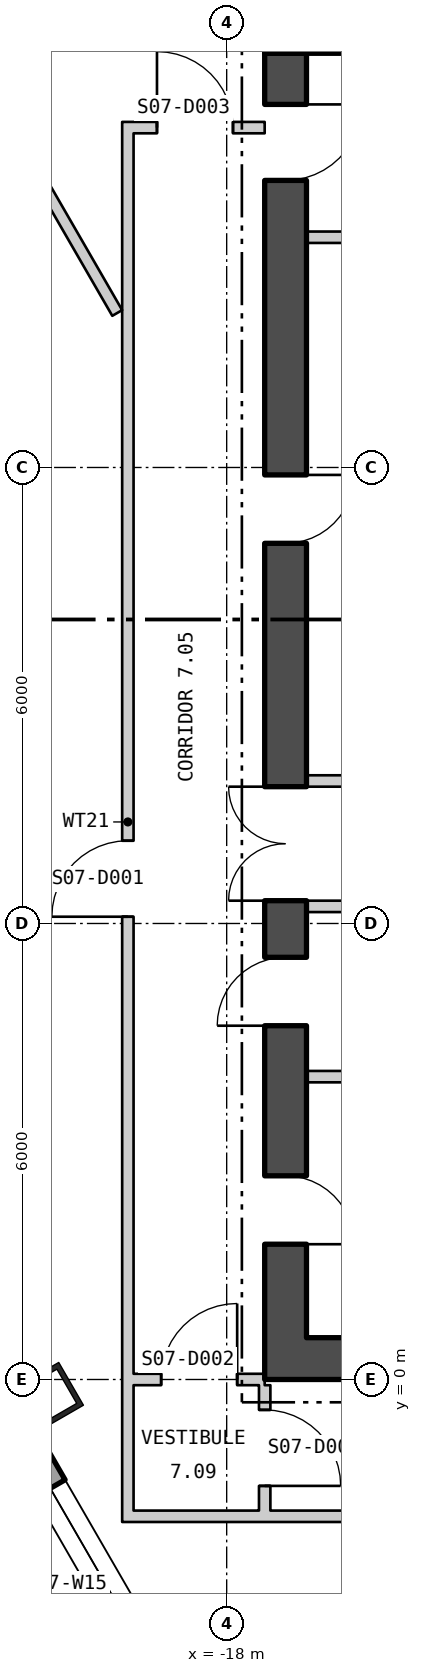
"""IFC4 building model, lengths in metres.
Left out: names, types, materials, properties, quantities, classifications, styles, units other than length and angle.
Written with IfcOpenShell. Run it as: python <this file> out.ifc"""

import sys

from ifc_helpers import new_model, si_unit, direction, frame, frame_2d, origin, origin_2d, place, context, subcontext, project, spatial, polyline, rectangle, hollow_rectangle, outline, extrude, element, fill, save


model = new_model("IFC4")
c1 = context("Model", 3, precision=1e-05, world=origin(), true_north=direction((0.0, 1.0)))
c2 = subcontext(c1, "Body", "Model", "MODEL_VIEW")
j1 = project(units=[si_unit("LENGTHUNIT", "METRE"), si_unit("PLANEANGLEUNIT", "RADIAN")], contexts=[c1])
p1 = place(None, origin())
s1 = spatial("IfcSite", under=j1, at=p1, CompositionType="ELEMENT")
p2 = place(p1, origin())
s2 = spatial("IfcBuilding", under=s1, at=p2, CompositionType="ELEMENT")
p3 = place(p2, frame((0.0, 0.0, 97.8)))
s3 = spatial("IfcBuildingStorey", under=s2, at=p3, CompositionType="ELEMENT", Elevation=97.8)
p4 = place(p3, frame((-20.35, -0.232, 0.0), z_axis=(0.0, 0.0, 1.0), x_axis=(0.5, -0.866025403784, 0.0)))
e1 = element("IfcColumn", 1, at=p4, inside=s3, PredefinedType="COLUMN", context=c2, shape_type="SweptSolid", body=[
    extrude(hollow_rectangle(XDim=0.65, YDim=0.7, WallThickness=0.065, at=origin_2d()), origin(), (0.0, 0.0, 1.0), 4.5),
])
p5 = place(p3, frame((-27.775, 11.479, -0.18), z_axis=(0.0, 0.0, 1.0), x_axis=(0.500000711659, -0.866024992908, 0.0)))
e2 = element("IfcWall", 2, at=p5, inside=s3, PredefinedType="SOLIDWALL", context=c2, shape_type="SweptSolid", body=[
    extrude(outline(polyline([(-0.13, -0.225), (45.87, -0.225), (45.61, 0.225), (0.13, 0.225), (-0.13, -0.225)])), origin(), (0.0, 0.0, 1.0), 4.28),
])
p6 = place(p5, frame((1.424, 0.0, 1.08)))
e3 = element("IfcOpeningElement", 3, at=p6, cuts=e2, PredefinedType="OPENING", context=c2, shape_type="SweptSolid", body=[
    extrude(rectangle(XDim=2.4, YDim=2.6, at=frame_2d((1.2, 1.3))), frame((0.0, 0.235, 0.0), z_axis=(0.0, -1.0, 0.0), x_axis=(1.0, 0.0, 0.0)), (0.0, 0.0, 1.0), 0.47),
])
p7 = place(p5, frame((5.893, 0.0, 1.08)))
e4 = element("IfcOpeningElement", 4, at=p7, cuts=e2, PredefinedType="OPENING", context=c2, shape_type="SweptSolid", body=[
    extrude(rectangle(XDim=2.4, YDim=2.6, at=frame_2d((1.2, 1.3))), frame((0.0, 0.235, 0.0), z_axis=(0.0, -1.0, 0.0), x_axis=(1.0, 0.0, 0.0)), (0.0, 0.0, 1.0), 0.47),
])
p8 = place(p5, frame((10.401, 0.0, 1.08)))
e5 = element("IfcOpeningElement", 5, at=p8, cuts=e2, PredefinedType="OPENING", context=c2, shape_type="SweptSolid", body=[
    extrude(rectangle(XDim=2.4, YDim=2.6, at=frame_2d((1.2, 1.3))), frame((0.0, 0.235, 0.0), z_axis=(0.0, -1.0, 0.0), x_axis=(1.0, 0.0, 0.0)), (0.0, 0.0, 1.0), 0.47),
])
p9 = place(p5, frame((14.909, 0.0, 1.08)))
e6 = element("IfcOpeningElement", 6, at=p9, cuts=e2, PredefinedType="OPENING", context=c2, shape_type="SweptSolid", body=[
    extrude(rectangle(XDim=2.4, YDim=2.6, at=frame_2d((1.2, 1.3))), frame((0.0, 0.235, 0.0), z_axis=(0.0, -1.0, 0.0), x_axis=(1.0, 0.0, 0.0)), (0.0, 0.0, 1.0), 0.47),
])
p10 = place(p5, frame((19.416, 0.0, 1.08)))
e7 = element("IfcOpeningElement", 7, at=p10, cuts=e2, PredefinedType="OPENING", context=c2, shape_type="SweptSolid", body=[
    extrude(rectangle(XDim=2.4, YDim=2.6, at=frame_2d((1.2, 1.3))), frame((0.0, 0.235, 0.0), z_axis=(0.0, -1.0, 0.0), x_axis=(1.0, 0.0, 0.0)), (0.0, 0.0, 1.0), 0.47),
])
p11 = place(p5, frame((23.924, 0.0, 1.08)))
e8 = element("IfcOpeningElement", 8, at=p11, cuts=e2, PredefinedType="OPENING", context=c2, shape_type="SweptSolid", body=[
    extrude(rectangle(XDim=2.4, YDim=2.6, at=frame_2d((1.2, 1.3))), frame((0.0, 0.235, 0.0), z_axis=(0.0, -1.0, 0.0), x_axis=(1.0, 0.0, 0.0)), (0.0, 0.0, 1.0), 0.47),
])
p12 = place(p5, frame((28.431, 0.0, 1.08)))
e9 = element("IfcOpeningElement", 9, at=p12, cuts=e2, PredefinedType="OPENING", context=c2, shape_type="SweptSolid", body=[
    extrude(rectangle(XDim=2.4, YDim=2.6, at=frame_2d((1.2, 1.3))), frame((0.0, 0.235, 0.0), z_axis=(0.0, -1.0, 0.0), x_axis=(1.0, 0.0, 0.0)), (0.0, 0.0, 1.0), 0.47),
])
p13 = place(p5, frame((32.939, 0.0, 1.08)))
e10 = element("IfcOpeningElement", 10, at=p13, cuts=e2, PredefinedType="OPENING", context=c2, shape_type="SweptSolid", body=[
    extrude(rectangle(XDim=2.4, YDim=2.6, at=frame_2d((1.2, 1.3))), frame((0.0, 0.235, 0.0), z_axis=(0.0, -1.0, 0.0), x_axis=(1.0, 0.0, 0.0)), (0.0, 0.0, 1.0), 0.47),
])
p14 = place(p5, frame((37.447, 0.0, 1.08)))
e11 = element("IfcOpeningElement", 11, at=p14, cuts=e2, PredefinedType="OPENING", context=c2, shape_type="SweptSolid", body=[
    extrude(rectangle(XDim=2.4, YDim=2.6, at=frame_2d((1.2, 1.3))), frame((0.0, 0.235, 0.0), z_axis=(0.0, -1.0, 0.0), x_axis=(1.0, 0.0, 0.0)), (0.0, 0.0, 1.0), 0.47),
])
p15 = place(p5, frame((41.916, 0.0, 1.08)))
e12 = element("IfcOpeningElement", 12, at=p15, cuts=e2, PredefinedType="OPENING", context=c2, shape_type="SweptSolid", body=[
    extrude(rectangle(XDim=2.4, YDim=2.6, at=frame_2d((1.2, 1.3))), frame((0.0, 0.235, 0.0), z_axis=(0.0, -1.0, 0.0), x_axis=(1.0, 0.0, 0.0)), (0.0, 0.0, 1.0), 0.47),
])
p16 = place(p3, frame((-17.5, 0.275, 0.0), z_axis=(0.0, 0.0, 1.0), x_axis=(1.0, 0.0, 0.0)))
e13 = element("IfcWall", 13, at=p16, inside=s3, PredefinedType="SHEAR", context=c2, shape_type="SweptSolid", body=[
    extrude(rectangle(XDim=35.0, YDim=0.55, at=frame_2d((17.5, 0.0))), origin(), (0.0, 0.0, 1.0), 4.3),
])
p17 = place(p16, frame((12.0, 0.0, 0.0)))
e14 = element("IfcOpeningElement", 14, at=p17, cuts=e13, PredefinedType="OPENING", context=c2, shape_type="SweptSolid", body=[
    extrude(rectangle(XDim=1.8, YDim=2.4, at=frame_2d((0.9, 1.2))), frame((0.0, 0.285, 0.0), z_axis=(0.0, -1.0, 0.0), x_axis=(1.0, 0.0, 0.0)), (0.0, 0.0, 1.0), 0.57),
])
p18 = place(p16, frame((22.0, 0.0, 0.0)))
e15 = element("IfcOpeningElement", 15, at=p18, cuts=e13, PredefinedType="OPENING", context=c2, shape_type="SweptSolid", body=[
    extrude(rectangle(XDim=1.8, YDim=2.4, at=frame_2d((0.9, 1.2))), frame((0.0, 0.285, 0.0), z_axis=(0.0, -1.0, 0.0), x_axis=(1.0, 0.0, 0.0)), (0.0, 0.0, 1.0), 0.57),
])
p19 = place(p3, frame((-17.5, 17.725, 0.0), z_axis=(0.0, 0.0, 1.0), x_axis=(1.0, 0.0, 0.0)))
e16 = element("IfcWall", 16, at=p19, inside=s3, PredefinedType="SHEAR", context=c2, shape_type="SweptSolid", body=[
    extrude(rectangle(XDim=35.0, YDim=0.55, at=frame_2d((17.5, 0.0))), origin(), (0.0, 0.0, 1.0), 4.3),
])
p20 = place(p3, frame((-17.225, 0.55, 0.0), z_axis=(0.0, 0.0, 1.0), x_axis=(0.0, 1.0, 0.0)))
e17 = element("IfcWall", 17, at=p20, inside=s3, PredefinedType="SHEAR", context=c2, shape_type="SweptSolid", body=[
    extrude(rectangle(XDim=16.9, YDim=0.55, at=frame_2d((8.45, 0.0))), origin(), (0.0, 0.0, 1.0), 4.3),
])
p21 = place(p20, frame((5.75, 0.0, 0.0)))
e18 = element("IfcOpeningElement", 18, at=p21, cuts=e17, PredefinedType="OPENING", context=c2, shape_type="SweptSolid", body=[
    extrude(rectangle(XDim=1.5, YDim=2.1, at=frame_2d((0.75, 1.05))), frame((0.0, 0.285, 0.0), z_axis=(0.0, -1.0, 0.0), x_axis=(1.0, 0.0, 0.0)), (0.0, 0.0, 1.0), 0.57),
])
p22 = place(p20, frame((1.23, 0.0, 0.0)))
e19 = element("IfcOpeningElement", 19, at=p22, cuts=e17, PredefinedType="OPENING", context=c2, shape_type="SweptSolid", body=[
    extrude(rectangle(XDim=0.9, YDim=2.1, at=frame_2d((0.45, 1.05))), frame((0.0, 0.285, 0.0), z_axis=(0.0, -1.0, 0.0), x_axis=(1.0, 0.0, 0.0)), (0.0, 0.0, 1.0), 0.57),
])
p23 = place(p20, frame((4.105, 0.0, 0.0)))
e20 = element("IfcOpeningElement", 20, at=p23, cuts=e17, PredefinedType="OPENING", context=c2, shape_type="SweptSolid", body=[
    extrude(rectangle(XDim=0.9, YDim=2.1, at=frame_2d((0.45, 1.05))), frame((0.0, 0.285, 0.0), z_axis=(0.0, -1.0, 0.0), x_axis=(1.0, 0.0, 0.0)), (0.0, 0.0, 1.0), 0.57),
])
p24 = place(p20, frame((10.452, 0.0, 0.0)))
e21 = element("IfcOpeningElement", 21, at=p24, cuts=e17, PredefinedType="OPENING", context=c2, shape_type="SweptSolid", body=[
    extrude(rectangle(XDim=0.9, YDim=2.1, at=frame_2d((0.45, 1.05))), frame((0.0, 0.285, 0.0), z_axis=(0.0, -1.0, 0.0), x_axis=(1.0, 0.0, 0.0)), (0.0, 0.0, 1.0), 0.57),
])
p25 = place(p20, frame((15.227, 0.0, 0.0)))
e22 = element("IfcOpeningElement", 22, at=p25, cuts=e17, PredefinedType="OPENING", context=c2, shape_type="SweptSolid", body=[
    extrude(rectangle(XDim=1.0, YDim=2.1, at=frame_2d((0.5, 1.05))), frame((0.0, 0.285, 0.0), z_axis=(0.0, -1.0, 0.0), x_axis=(1.0, 0.0, 0.0)), (0.0, 0.0, 1.0), 0.57),
])
for number, where, z_axis, x_axis in (
    (23, (-16.95, 6.225, 0.0), (0.0, 0.0, 1.0), (1.0, 0.0, 0.0)),
    (24, (-16.95, 7.875, 0.0), (0.0, 0.0, 1.0), (1.0, 0.0, 0.0)),
    (25, (-16.95, 3.985, 0.0), (0.0, 0.0, 1.0), (1.0, 0.0, 0.0)),
    (26, (-16.95, 15.029, 0.0), (0.0, 0.0, 1.0), (1.0, 0.0, 0.0)),
):
    element("IfcWall", number, at=place(p3, frame(where, z_axis=z_axis, x_axis=x_axis)), inside=s3, PredefinedType="PARTITIONING", context=c2, shape_type="SweptSolid", body=[
        extrude(rectangle(XDim=2.45, YDim=0.15, at=frame_2d((1.225, 0.0))), origin(), (0.0, 0.0, 1.0), 4.3),
    ])
p26 = place(p3, frame((-22.411, 19.18, 0.0), z_axis=(0.0, 0.0, 1.0), x_axis=(0.499921522108, -0.866070708276, 0.0)))
e27 = element("IfcWall", 27, at=p26, inside=s3, PredefinedType="PARTITIONING", context=c2, shape_type="SweptSolid", body=[
    extrude(rectangle(XDim=5.943, YDim=0.15, at=frame_2d((2.971, 0.0))), origin(), (0.0, 0.0, 1.0), 4.3),
])
p27 = place(p3, frame((-19.3, -1.875, 0.0), z_axis=(0.0, 0.0, 1.0), x_axis=(0.0, 1.0, 0.0)))
e28 = element("IfcWall", 28, at=p27, inside=s3, PredefinedType="PARTITIONING", context=c2, shape_type="SweptSolid", body=[
    extrude(rectangle(XDim=18.422, YDim=0.15, at=frame_2d((9.211, 0.0))), origin(), (0.0, 0.0, 1.0), 4.3),
])
p28 = place(p27, frame((7.964, 0.0, 0.0)))
e29 = element("IfcOpeningElement", 29, at=p28, cuts=e28, PredefinedType="OPENING", context=c2, shape_type="SweptSolid", body=[
    extrude(rectangle(XDim=1.0, YDim=2.1, at=frame_2d((0.5, 1.05))), frame((0.0, 0.085, 0.0), z_axis=(0.0, -1.0, 0.0), x_axis=(1.0, 0.0, 0.0)), (0.0, 0.0, 1.0), 0.17),
])
p29 = place(p3, frame((-19.225, -1.8, 0.0), z_axis=(0.0, 0.0, 1.0), x_axis=(1.0, 0.0, 0.0)))
e30 = element("IfcWall", 30, at=p29, inside=s3, PredefinedType="PARTITIONING", context=c2, shape_type="SweptSolid", body=[
    extrude(rectangle(XDim=11.63, YDim=0.15, at=frame_2d((5.815, 0.0))), origin(), (0.0, 0.0, 1.0), 4.3),
])
p30 = place(p3, frame((-19.225, 0.0, 0.0), z_axis=(0.0, 0.0, 1.0), x_axis=(1.0, 0.0, 0.0)))
e31 = element("IfcWall", 31, at=p30, inside=s3, PredefinedType="PARTITIONING", context=c2, shape_type="SweptSolid", body=[
    extrude(rectangle(XDim=1.725, YDim=0.15, at=frame_2d((0.863, 0.0))), origin(), (0.0, 0.0, 1.0), 3.7),
])
p31 = place(p30, frame((0.363, 0.0, 0.0)))
e32 = element("IfcOpeningElement", 32, at=p31, cuts=e31, PredefinedType="OPENING", context=c2, shape_type="SweptSolid", body=[
    extrude(rectangle(XDim=1.0, YDim=2.1, at=frame_2d((0.5, 1.05))), frame((0.0, 0.085, 0.0), z_axis=(0.0, -1.0, 0.0), x_axis=(1.0, 0.0, 0.0)), (0.0, 0.0, 1.0), 0.17),
])
p32 = place(p3, frame((-19.225, 16.472, 0.0), z_axis=(0.0, 0.0, 1.0), x_axis=(1.0, 0.0, 0.0)))
e33 = element("IfcWall", 33, at=p32, inside=s3, PredefinedType="PARTITIONING", context=c2, shape_type="SweptSolid", body=[
    extrude(rectangle(XDim=1.725, YDim=0.15, at=frame_2d((0.863, 0.0))), origin(), (0.0, 0.0, 1.0), 4.3),
])
p33 = place(p32, frame((0.308, 0.0, 0.0)))
e34 = element("IfcOpeningElement", 34, at=p33, cuts=e33, PredefinedType="OPENING", context=c2, shape_type="SweptSolid", body=[
    extrude(rectangle(XDim=1.0, YDim=2.1, at=frame_2d((0.5, 1.05))), frame((0.0, 0.085, 0.0), z_axis=(0.0, -1.0, 0.0), x_axis=(1.0, 0.0, 0.0)), (0.0, 0.0, 1.0), 0.17),
])
p34 = place(p3, frame((-17.5, -1.725, 0.0), z_axis=(0.0, 0.0, 1.0), x_axis=(0.0, 1.0, 0.0)))
e35 = element("IfcWall", 35, at=p34, inside=s3, PredefinedType="PARTITIONING", context=c2, shape_type="SweptSolid", body=[
    extrude(rectangle(XDim=1.65, YDim=0.15, at=frame_2d((0.825, 0.0))), origin(), (0.0, 0.0, 1.0), 4.3),
])
p35 = place(p34, frame((0.325, 0.0, 0.0)))
e36 = element("IfcOpeningElement", 36, at=p35, cuts=e35, PredefinedType="OPENING", context=c2, shape_type="SweptSolid", body=[
    extrude(rectangle(XDim=1.0, YDim=2.1, at=frame_2d((0.5, 1.05))), frame((0.0, 0.085, 0.0), z_axis=(0.0, -1.0, 0.0), x_axis=(1.0, 0.0, 0.0)), (0.0, 0.0, 1.0), 0.17),
])
p36 = place(p9, origin())
e37 = element("IfcWindow", 37, at=p36, inside=s3, PartitioningType="SINGLE_PANEL", PredefinedType="WINDOW", context=c2, shape_type="SweptSolid", body=[
    extrude(rectangle(XDim=2.4, YDim=2.6, at=frame_2d((1.2, 1.3))), frame((0.0, 0.105, 0.0), z_axis=(0.0, -1.0, 0.0), x_axis=(1.0, 0.0, 0.0)), (0.0, 0.0, 1.0), 0.06),
])
fill(e6, e37)
p37 = place(p21, origin())
e38 = element("IfcDoor", 38, at=p37, inside=s3, OperationType="DOUBLE_DOOR_SINGLE_SWING", PredefinedType="DOOR", context=c2, shape_type="SweptSolid", body=[
    extrude(rectangle(XDim=1.5, YDim=2.1, at=frame_2d((0.75, 1.05))), frame((0.0, 0.025, 0.0), z_axis=(0.0, -1.0, 0.0), x_axis=(1.0, 0.0, 0.0)), (0.0, 0.0, 1.0), 0.05),
])
fill(e18, e38)
p38 = place(p22, origin())
e39 = element("IfcDoor", 39, at=p38, inside=s3, OperationType="SINGLE_SWING_LEFT", PredefinedType="DOOR", context=c2, shape_type="SweptSolid", body=[
    extrude(rectangle(XDim=0.9, YDim=2.1, at=frame_2d((0.45, 1.05))), frame((0.0, 0.025, 0.0), z_axis=(0.0, -1.0, 0.0), x_axis=(1.0, 0.0, 0.0)), (0.0, 0.0, 1.0), 0.05),
])
fill(e19, e39)
p39 = place(p23, origin())
e40 = element("IfcDoor", 40, at=p39, inside=s3, OperationType="SINGLE_SWING_RIGHT", PredefinedType="DOOR", context=c2, shape_type="SweptSolid", body=[
    extrude(rectangle(XDim=0.9, YDim=2.1, at=frame_2d((0.45, 1.05))), frame((0.0, 0.025, 0.0), z_axis=(0.0, -1.0, 0.0), x_axis=(1.0, 0.0, 0.0)), (0.0, 0.0, 1.0), 0.05),
])
fill(e20, e40)
p40 = place(p24, origin())
e41 = element("IfcDoor", 41, at=p40, inside=s3, OperationType="SINGLE_SWING_RIGHT", PredefinedType="DOOR", context=c2, shape_type="SweptSolid", body=[
    extrude(rectangle(XDim=0.9, YDim=2.1, at=frame_2d((0.45, 1.05))), frame((0.0, 0.025, 0.0), z_axis=(0.0, -1.0, 0.0), x_axis=(1.0, 0.0, 0.0)), (0.0, 0.0, 1.0), 0.05),
])
fill(e21, e41)
p41 = place(p25, origin())
e42 = element("IfcDoor", 42, at=p41, inside=s3, OperationType="SINGLE_SWING_RIGHT", PredefinedType="DOOR", context=c2, shape_type="SweptSolid", body=[
    extrude(rectangle(XDim=1.0, YDim=2.1, at=frame_2d((0.5, 1.05))), frame((0.0, 0.025, 0.0), z_axis=(0.0, -1.0, 0.0), x_axis=(1.0, 0.0, 0.0)), (0.0, 0.0, 1.0), 0.05),
])
fill(e22, e42)
p42 = place(p28, origin())
e43 = element("IfcDoor", 43, at=p42, inside=s3, OperationType="SINGLE_SWING_RIGHT", PredefinedType="DOOR", context=c2, shape_type="SweptSolid", body=[
    extrude(rectangle(XDim=1.0, YDim=2.1, at=frame_2d((0.5, 1.05))), frame((0.0, 0.025, 0.0), z_axis=(0.0, -1.0, 0.0), x_axis=(1.0, 0.0, 0.0)), (0.0, 0.0, 1.0), 0.05),
])
fill(e29, e43)
p43 = place(p31, origin())
e44 = element("IfcDoor", 44, at=p43, inside=s3, OperationType="SINGLE_SWING_LEFT", PredefinedType="DOOR", context=c2, shape_type="SweptSolid", body=[
    extrude(rectangle(XDim=1.0, YDim=2.1, at=frame_2d((0.5, 1.05))), frame((0.0, 0.025, 0.0), z_axis=(0.0, -1.0, 0.0), x_axis=(1.0, 0.0, 0.0)), (0.0, 0.0, 1.0), 0.05),
])
fill(e32, e44)
p44 = place(p33, origin())
e45 = element("IfcDoor", 45, at=p44, inside=s3, OperationType="SINGLE_SWING_RIGHT", PredefinedType="DOOR", context=c2, shape_type="SweptSolid", body=[
    extrude(rectangle(XDim=1.0, YDim=2.1, at=frame_2d((0.5, 1.05))), frame((0.0, 0.025, 0.0), z_axis=(0.0, -1.0, 0.0), x_axis=(1.0, 0.0, 0.0)), (0.0, 0.0, 1.0), 0.05),
])
fill(e34, e45)
p45 = place(p35, origin())
e46 = element("IfcDoor", 46, at=p45, inside=s3, OperationType="SINGLE_SWING_LEFT", PredefinedType="DOOR", context=c2, shape_type="SweptSolid", body=[
    extrude(rectangle(XDim=1.0, YDim=2.1, at=frame_2d((0.5, 1.05))), frame((0.0, 0.025, 0.0), z_axis=(0.0, -1.0, 0.0), x_axis=(1.0, 0.0, 0.0)), (0.0, 0.0, 1.0), 0.05),
])
fill(e36, e46)
save(model, sys.argv[1])
